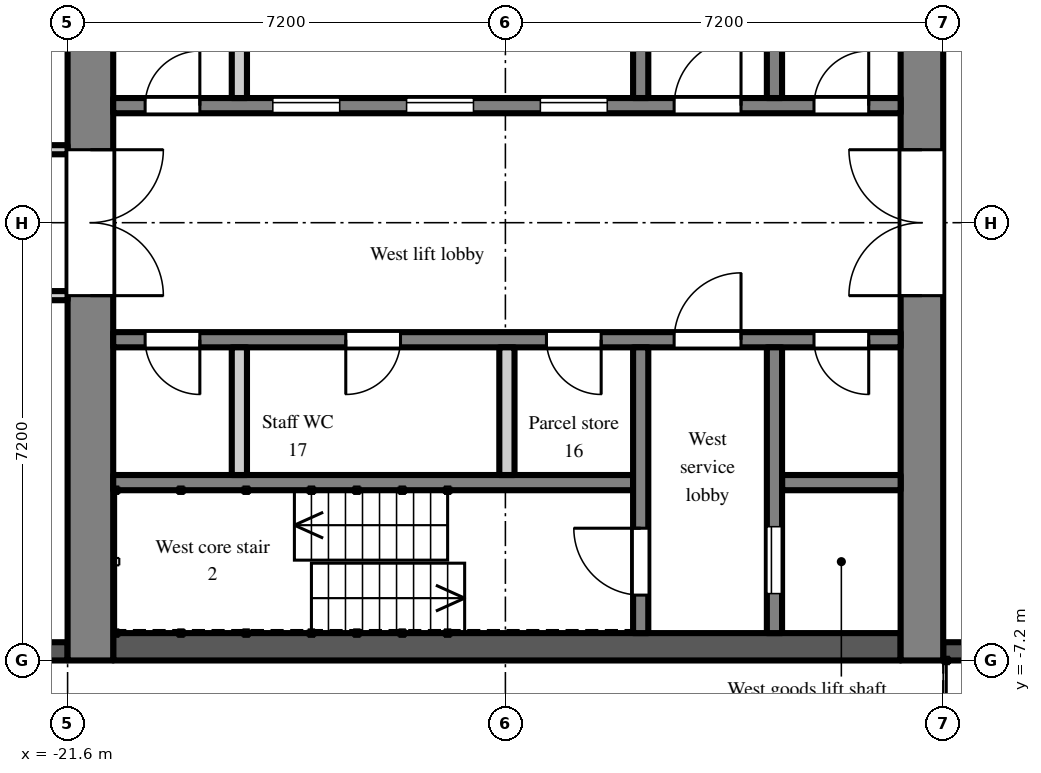
"""IFC4 building model, lengths in metres.
Left out: names, types, materials, properties, quantities, classifications, styles, units other than length and angle.
Written with IfcOpenShell. Run it as: python <this file> out.ifc"""

import sys

from ifc_helpers import new_model, si_unit, direction, frame, frame_2d, origin, place, context, subcontext, project, spatial, rectangle, extrude, element, fill, save


model = new_model("IFC4")
c1 = context("Model", 3, precision=1e-05, world=origin(), true_north=direction((0.0, 1.0)))
c2 = subcontext(c1, "Body", "Model", "MODEL_VIEW")
j1 = project(units=[si_unit("LENGTHUNIT", "METRE"), si_unit("PLANEANGLEUNIT", "RADIAN")], contexts=[c1])
p1 = place(None, origin())
s1 = spatial("IfcSite", under=j1, at=p1, CompositionType="ELEMENT")
p2 = place(p1, origin())
s2 = spatial("IfcBuilding", under=s1, at=p2, CompositionType="ELEMENT")
p3 = place(p2, frame((0.0, 0.0, 147.3)))
s3 = spatial("IfcBuildingStorey", under=s2, at=p3, CompositionType="ELEMENT", Elevation=147.3)
p4 = place(p3, frame((-24.3, -7.05, 0.0), z_axis=(0.0, 0.0, 1.0), x_axis=(1.0, 0.0, 0.0)))
e1 = element("IfcWall", 1, at=p4, inside=s3, PredefinedType="SOLIDWALL", context=c2, shape_type="SweptSolid", body=[
    extrude(rectangle(XDim=2.7, YDim=0.3, at=frame_2d((1.35, 0.0))), origin(), (0.0, 0.0, 1.0), 2.2),
])
p5 = place(p4, frame((0.75, 0.0, 0.2)))
e2 = element("IfcOpeningElement", 2, at=p5, cuts=e1, PredefinedType="OPENING", context=c2, shape_type="SweptSolid", body=[
    extrude(rectangle(XDim=1.2, YDim=1.85, at=frame_2d((0.6, 0.925))), frame((0.0, 0.16, 0.0), z_axis=(0.0, -1.0, 0.0), x_axis=(1.0, 0.0, 0.0)), (0.0, 0.0, 1.0), 0.32),
])
p6 = place(p3, frame((-7.2, -7.05, 0.0), z_axis=(0.0, 0.0, 1.0), x_axis=(1.0, 0.0, 0.0)))
e3 = element("IfcWall", 3, at=p6, inside=s3, PredefinedType="SOLIDWALL", context=c2, shape_type="SweptSolid", body=[
    extrude(rectangle(XDim=3.0, YDim=0.3, at=frame_2d((1.5, 0.0))), origin(), (0.0, 0.0, 1.0), 2.2),
])
p7 = place(p3, frame((-7.55, -7.2, 0.0), z_axis=(0.0, 0.0, 1.0), x_axis=(0.0, 1.0, 0.0)))
e4 = element("IfcWall", 4, at=p7, inside=s3, PredefinedType="SHEAR", context=c2, shape_type="SweptSolid", body=[
    extrude(rectangle(XDim=14.4, YDim=0.7, at=frame_2d((7.2, 0.0))), origin(), (0.0, 0.0, 1.0), 2.6),
])
p8 = place(p7, frame((6.0, 0.0, 0.0)))
e5 = element("IfcOpeningElement", 5, at=p8, cuts=e4, PredefinedType="OPENING", context=c2, shape_type="SweptSolid", body=[
    extrude(rectangle(XDim=2.4, YDim=2.2, at=frame_2d((1.2, 1.1))), frame((0.0, 0.36, 0.0), z_axis=(0.0, -1.0, 0.0), x_axis=(1.0, 0.0, 0.0)), (0.0, 0.0, 1.0), 0.72),
])
p9 = place(p3, frame((-21.225, -7.2, 0.0), z_axis=(0.0, 0.0, 1.0), x_axis=(0.0, 1.0, 0.0)))
e6 = element("IfcWall", 6, at=p9, inside=s3, PredefinedType="SHEAR", context=c2, shape_type="SweptSolid", body=[
    extrude(rectangle(XDim=14.4, YDim=0.75, at=frame_2d((7.2, 0.0))), origin(), (0.0, 0.0, 1.0), 2.6),
])
p10 = place(p9, frame((6.0, 0.0, 0.0)))
e7 = element("IfcOpeningElement", 7, at=p10, cuts=e6, PredefinedType="OPENING", context=c2, shape_type="SweptSolid", body=[
    extrude(rectangle(XDim=2.4, YDim=2.2, at=frame_2d((1.2, 1.1))), frame((0.0, 0.385, 0.0), z_axis=(0.0, -1.0, 0.0), x_axis=(1.0, 0.0, 0.0)), (0.0, 0.0, 1.0), 0.77),
])
p11 = place(p3, frame((-7.9, 1.925, 0.0), z_axis=(0.0, 0.0, 1.0), x_axis=(-1.0, 0.0, 0.0)))
e8 = element("IfcWall", 8, at=p11, inside=s3, PredefinedType="SHEAR", context=c2, shape_type="SweptSolid", body=[
    extrude(rectangle(XDim=12.95, YDim=0.25, at=frame_2d((6.475, 0.0))), origin(), (0.0, 0.0, 1.0), 2.6),
])
p12 = place(p11, frame((4.825, 0.0, 0.0)))
e9 = element("IfcOpeningElement", 9, at=p12, cuts=e8, PredefinedType="OPENING", context=c2, shape_type="SweptSolid", body=[
    extrude(rectangle(XDim=1.1, YDim=2.1, at=frame_2d((0.55, 1.05))), frame((0.0, 0.135, 0.0), z_axis=(0.0, -1.0, 0.0), x_axis=(1.0, 0.0, 0.0)), (0.0, 0.0, 1.0), 0.27),
])
p13 = place(p11, frame((7.025, 0.0, 0.0)))
e10 = element("IfcOpeningElement", 10, at=p13, cuts=e8, PredefinedType="OPENING", context=c2, shape_type="SweptSolid", body=[
    extrude(rectangle(XDim=1.1, YDim=2.1, at=frame_2d((0.55, 1.05))), frame((0.0, 0.135, 0.0), z_axis=(0.0, -1.0, 0.0), x_axis=(1.0, 0.0, 0.0)), (0.0, 0.0, 1.0), 0.27),
])
p14 = place(p11, frame((9.225, 0.0, 0.0)))
e11 = element("IfcOpeningElement", 11, at=p14, cuts=e8, PredefinedType="OPENING", context=c2, shape_type="SweptSolid", body=[
    extrude(rectangle(XDim=1.1, YDim=2.1, at=frame_2d((0.55, 1.05))), frame((0.0, 0.135, 0.0), z_axis=(0.0, -1.0, 0.0), x_axis=(1.0, 0.0, 0.0)), (0.0, 0.0, 1.0), 0.27),
])
p15 = place(p11, frame((0.525, 0.0, 0.0)))
e12 = element("IfcOpeningElement", 12, at=p15, cuts=e8, PredefinedType="OPENING", context=c2, shape_type="SweptSolid", body=[
    extrude(rectangle(XDim=0.9, YDim=2.1, at=frame_2d((0.45, 1.05))), frame((0.0, 0.135, 0.0), z_axis=(0.0, -1.0, 0.0), x_axis=(1.0, 0.0, 0.0)), (0.0, 0.0, 1.0), 0.27),
])
p16 = place(p11, frame((2.625, 0.0, 0.0)))
e13 = element("IfcOpeningElement", 13, at=p16, cuts=e8, PredefinedType="OPENING", context=c2, shape_type="SweptSolid", body=[
    extrude(rectangle(XDim=1.1, YDim=2.1, at=frame_2d((0.55, 1.05))), frame((0.0, 0.135, 0.0), z_axis=(0.0, -1.0, 0.0), x_axis=(1.0, 0.0, 0.0)), (0.0, 0.0, 1.0), 0.27),
])
p17 = place(p11, frame((11.525, 0.0, 0.0)))
e14 = element("IfcOpeningElement", 14, at=p17, cuts=e8, PredefinedType="OPENING", context=c2, shape_type="SweptSolid", body=[
    extrude(rectangle(XDim=0.9, YDim=2.1, at=frame_2d((0.45, 1.05))), frame((0.0, 0.135, 0.0), z_axis=(0.0, -1.0, 0.0), x_axis=(1.0, 0.0, 0.0)), (0.0, 0.0, 1.0), 0.27),
])
p18 = place(p3, frame((-9.975, 2.05, 0.0), z_axis=(0.0, 0.0, 1.0), x_axis=(0.0, 1.0, 0.0)))
e15 = element("IfcWall", 15, at=p18, inside=s3, PredefinedType="SHEAR", context=c2, shape_type="SweptSolid", body=[
    extrude(rectangle(XDim=4.7, YDim=0.25, at=frame_2d((2.35, 0.0))), origin(), (0.0, 0.0, 1.0), 2.6),
])
p19 = place(p18, frame((2.95, 0.0, 0.0)))
e16 = element("IfcOpeningElement", 16, at=p19, cuts=e15, PredefinedType="OPENING", context=c2, shape_type="SweptSolid", body=[
    extrude(rectangle(XDim=1.1, YDim=2.1, at=frame_2d((0.55, 1.05))), frame((0.0, 0.135, 0.0), z_axis=(0.0, -1.0, 0.0), x_axis=(1.0, 0.0, 0.0)), (0.0, 0.0, 1.0), 0.27),
])
p20 = place(p3, frame((-12.175, 2.05, 0.0), z_axis=(0.0, 0.0, 1.0), x_axis=(0.0, 1.0, 0.0)))
e17 = element("IfcWall", 17, at=p20, inside=s3, PredefinedType="SHEAR", context=c2, shape_type="SweptSolid", body=[
    extrude(rectangle(XDim=4.7, YDim=0.25, at=frame_2d((2.35, 0.0))), origin(), (0.0, 0.0, 1.0), 2.6),
])
p21 = place(p20, frame((2.975, 0.0, 0.0)))
e18 = element("IfcOpeningElement", 18, at=p21, cuts=e17, PredefinedType="OPENING", context=c2, shape_type="SweptSolid", body=[
    extrude(rectangle(XDim=1.1, YDim=2.1, at=frame_2d((0.55, 1.05))), frame((0.0, 0.135, 0.0), z_axis=(0.0, -1.0, 0.0), x_axis=(1.0, 0.0, 0.0)), (0.0, 0.0, 1.0), 0.27),
])
p22 = place(p3, frame((-18.775, 2.05, 0.0), z_axis=(0.0, 0.0, 1.0), x_axis=(0.0, 1.0, 0.0)))
e19 = element("IfcWall", 19, at=p22, inside=s3, PredefinedType="PARTITIONING", context=c2, shape_type="SweptSolid", body=[
    extrude(rectangle(XDim=2.1, YDim=0.25, at=frame_2d((1.05, 0.0))), origin(), (0.0, 0.0, 1.0), 2.6),
])
p23 = place(p3, frame((-7.9, -6.975, 0.0), z_axis=(0.0, 0.0, 1.0), x_axis=(-1.0, 0.0, 0.0)))
e20 = element("IfcWall", 20, at=p23, inside=s3, PredefinedType="SHEAR", context=c2, shape_type="SweptSolid", body=[
    extrude(rectangle(XDim=12.95, YDim=0.45, at=frame_2d((6.475, 0.0))), origin(), (0.0, 0.0, 1.0), 2.6),
])
p24 = place(p3, frame((-7.9, -1.925, 0.0), z_axis=(0.0, 0.0, 1.0), x_axis=(-1.0, 0.0, 0.0)))
e21 = element("IfcWall", 21, at=p24, inside=s3, PredefinedType="SHEAR", context=c2, shape_type="SweptSolid", body=[
    extrude(rectangle(XDim=12.95, YDim=0.25, at=frame_2d((6.475, 0.0))), origin(), (0.0, 0.0, 1.0), 2.6),
])
p25 = place(p24, frame((0.525, 0.0, 0.0)))
e22 = element("IfcOpeningElement", 22, at=p25, cuts=e21, PredefinedType="OPENING", context=c2, shape_type="SweptSolid", body=[
    extrude(rectangle(XDim=0.9, YDim=2.1, at=frame_2d((0.45, 1.05))), frame((0.0, 0.135, 0.0), z_axis=(0.0, -1.0, 0.0), x_axis=(1.0, 0.0, 0.0)), (0.0, 0.0, 1.0), 0.27),
])
p26 = place(p24, frame((2.625, 0.0, 0.0)))
e23 = element("IfcOpeningElement", 23, at=p26, cuts=e21, PredefinedType="OPENING", context=c2, shape_type="SweptSolid", body=[
    extrude(rectangle(XDim=1.1, YDim=2.1, at=frame_2d((0.55, 1.05))), frame((0.0, 0.135, 0.0), z_axis=(0.0, -1.0, 0.0), x_axis=(1.0, 0.0, 0.0)), (0.0, 0.0, 1.0), 0.27),
])
p27 = place(p24, frame((4.925, 0.0, 0.0)))
e24 = element("IfcOpeningElement", 24, at=p27, cuts=e21, PredefinedType="OPENING", context=c2, shape_type="SweptSolid", body=[
    extrude(rectangle(XDim=0.9, YDim=2.1, at=frame_2d((0.45, 1.05))), frame((0.0, 0.135, 0.0), z_axis=(0.0, -1.0, 0.0), x_axis=(1.0, 0.0, 0.0)), (0.0, 0.0, 1.0), 0.27),
])
p28 = place(p24, frame((8.225, 0.0, 0.0)))
e25 = element("IfcOpeningElement", 25, at=p28, cuts=e21, PredefinedType="OPENING", context=c2, shape_type="SweptSolid", body=[
    extrude(rectangle(XDim=0.9, YDim=2.1, at=frame_2d((0.45, 1.05))), frame((0.0, 0.135, 0.0), z_axis=(0.0, -1.0, 0.0), x_axis=(1.0, 0.0, 0.0)), (0.0, 0.0, 1.0), 0.27),
])
p29 = place(p24, frame((11.525, 0.0, 0.0)))
e26 = element("IfcOpeningElement", 26, at=p29, cuts=e21, PredefinedType="OPENING", context=c2, shape_type="SweptSolid", body=[
    extrude(rectangle(XDim=0.9, YDim=2.1, at=frame_2d((0.45, 1.05))), frame((0.0, 0.135, 0.0), z_axis=(0.0, -1.0, 0.0), x_axis=(1.0, 0.0, 0.0)), (0.0, 0.0, 1.0), 0.27),
])
p30 = place(p3, frame((-7.9, -4.275, 0.0), z_axis=(0.0, 0.0, 1.0), x_axis=(-1.0, 0.0, 0.0)))
e27 = element("IfcWall", 27, at=p30, inside=s3, PredefinedType="SHEAR", context=c2, shape_type="SweptSolid", body=[
    extrude(rectangle(XDim=1.95, YDim=0.25, at=frame_2d((0.975, 0.0))), origin(), (0.0, 0.0, 1.0), 2.6),
])
p31 = place(p3, frame((-12.3, -4.275, 0.0), z_axis=(0.0, 0.0, 1.0), x_axis=(-1.0, 0.0, 0.0)))
e28 = element("IfcWall", 28, at=p31, inside=s3, PredefinedType="SHEAR", context=c2, shape_type="SweptSolid", body=[
    extrude(rectangle(XDim=8.55, YDim=0.25, at=frame_2d((4.275, 0.0))), origin(), (0.0, 0.0, 1.0), 2.6),
])
p32 = place(p3, frame((-9.975, -2.05, 0.0), z_axis=(0.0, 0.0, 1.0), x_axis=(0.0, -1.0, 0.0)))
e29 = element("IfcWall", 29, at=p32, inside=s3, PredefinedType="SHEAR", context=c2, shape_type="SweptSolid", body=[
    extrude(rectangle(XDim=4.7, YDim=0.25, at=frame_2d((2.35, 0.0))), origin(), (0.0, 0.0, 1.0), 2.6),
])
p33 = place(p32, frame((2.95, 0.0, 0.0)))
e30 = element("IfcOpeningElement", 30, at=p33, cuts=e29, PredefinedType="OPENING", context=c2, shape_type="SweptSolid", body=[
    extrude(rectangle(XDim=1.1, YDim=2.1, at=frame_2d((0.55, 1.05))), frame((0.0, 0.135, 0.0), z_axis=(0.0, -1.0, 0.0), x_axis=(1.0, 0.0, 0.0)), (0.0, 0.0, 1.0), 0.27),
])
p34 = place(p3, frame((-12.175, -2.05, 0.0), z_axis=(0.0, 0.0, 1.0), x_axis=(0.0, -1.0, 0.0)))
e31 = element("IfcWall", 31, at=p34, inside=s3, PredefinedType="SHEAR", context=c2, shape_type="SweptSolid", body=[
    extrude(rectangle(XDim=4.7, YDim=0.25, at=frame_2d((2.35, 0.0))), origin(), (0.0, 0.0, 1.0), 2.6),
])
p35 = place(p34, frame((2.975, 0.0, 0.0)))
e32 = element("IfcOpeningElement", 32, at=p35, cuts=e31, PredefinedType="OPENING", context=c2, shape_type="SweptSolid", body=[
    extrude(rectangle(XDim=1.1, YDim=2.1, at=frame_2d((0.55, 1.05))), frame((0.0, 0.135, 0.0), z_axis=(0.0, -1.0, 0.0), x_axis=(1.0, 0.0, 0.0)), (0.0, 0.0, 1.0), 0.27),
])
for number, where, z_axis, x_axis in (
    (33, (-14.375, -2.05, 0.0), (0.0, 0.0, 1.0), (0.0, -1.0, 0.0)),
    (34, (-18.775, -2.05, 0.0), (0.0, 0.0, 1.0), (0.0, -1.0, 0.0)),
):
    element("IfcWall", number, at=place(p3, frame(where, z_axis=z_axis, x_axis=x_axis)), inside=s3, PredefinedType="PARTITIONING", context=c2, shape_type="SweptSolid", body=[
        extrude(rectangle(XDim=2.1, YDim=0.25, at=frame_2d((1.05, 0.0))), origin(), (0.0, 0.0, 1.0), 2.6),
    ])
p36 = place(p3, frame((-36.5, -1.2, 0.0), z_axis=(0.0, 0.0, 1.0), x_axis=(1.0, 0.0, 0.0)))
e35 = element("IfcWall", 35, at=p36, inside=s3, PredefinedType="PARTITIONING", context=c2, shape_type="SweptSolid", body=[
    extrude(rectangle(XDim=14.9, YDim=0.15, at=frame_2d((7.45, 0.0))), origin(), (0.0, 0.0, 1.0), 2.6),
])
p37 = place(p36, frame((7.9, 0.0, 0.0)))
e36 = element("IfcOpeningElement", 36, at=p37, cuts=e35, PredefinedType="OPENING", context=c2, shape_type="SweptSolid", body=[
    extrude(rectangle(XDim=1.0, YDim=2.1, at=frame_2d((0.5, 1.05))), frame((0.0, 0.085, 0.0), z_axis=(0.0, -1.0, 0.0), x_axis=(1.0, 0.0, 0.0)), (0.0, 0.0, 1.0), 0.17),
])
p38 = place(p36, frame((6.35, 0.0, 0.0)))
e37 = element("IfcOpeningElement", 37, at=p38, cuts=e35, PredefinedType="OPENING", context=c2, shape_type="SweptSolid", body=[
    extrude(rectangle(XDim=0.9, YDim=2.1, at=frame_2d((0.45, 1.05))), frame((0.0, 0.085, 0.0), z_axis=(0.0, -1.0, 0.0), x_axis=(1.0, 0.0, 0.0)), (0.0, 0.0, 1.0), 0.17),
])
p39 = place(p36, frame((4.55, 0.0, 0.0)))
e38 = element("IfcOpeningElement", 38, at=p39, cuts=e35, PredefinedType="OPENING", context=c2, shape_type="SweptSolid", body=[
    extrude(rectangle(XDim=0.9, YDim=2.1, at=frame_2d((0.45, 1.05))), frame((0.0, 0.085, 0.0), z_axis=(0.0, -1.0, 0.0), x_axis=(1.0, 0.0, 0.0)), (0.0, 0.0, 1.0), 0.17),
])
p40 = place(p36, frame((1.15, 0.0, 0.0)))
e39 = element("IfcOpeningElement", 39, at=p40, cuts=e35, PredefinedType="OPENING", context=c2, shape_type="SweptSolid", body=[
    extrude(rectangle(XDim=1.8, YDim=2.1, at=frame_2d((0.9, 1.05))), frame((0.0, 0.085, 0.0), z_axis=(0.0, -1.0, 0.0), x_axis=(1.0, 0.0, 0.0)), (0.0, 0.0, 1.0), 0.17),
])
p41 = place(p3, frame((-36.5, 1.2, 0.0), z_axis=(0.0, 0.0, 1.0), x_axis=(1.0, 0.0, 0.0)))
e40 = element("IfcWall", 40, at=p41, inside=s3, PredefinedType="PARTITIONING", context=c2, shape_type="SweptSolid", body=[
    extrude(rectangle(XDim=14.9, YDim=0.15, at=frame_2d((7.45, 0.0))), origin(), (0.0, 0.0, 1.0), 2.6),
])
p42 = place(p41, frame((13.55, 0.0, 0.0)))
e41 = element("IfcOpeningElement", 41, at=p42, cuts=e40, PredefinedType="OPENING", context=c2, shape_type="SweptSolid", body=[
    extrude(rectangle(XDim=0.9, YDim=2.1, at=frame_2d((0.45, 1.05))), frame((0.0, 0.085, 0.0), z_axis=(0.0, -1.0, 0.0), x_axis=(1.0, 0.0, 0.0)), (0.0, 0.0, 1.0), 0.17),
])
p43 = place(p41, frame((11.75, 0.0, 0.0)))
e42 = element("IfcOpeningElement", 42, at=p43, cuts=e40, PredefinedType="OPENING", context=c2, shape_type="SweptSolid", body=[
    extrude(rectangle(XDim=0.9, YDim=2.1, at=frame_2d((0.45, 1.05))), frame((0.0, 0.085, 0.0), z_axis=(0.0, -1.0, 0.0), x_axis=(1.0, 0.0, 0.0)), (0.0, 0.0, 1.0), 0.17),
])
p44 = place(p41, frame((8.3, 0.0, 0.0)))
e43 = element("IfcOpeningElement", 43, at=p44, cuts=e40, PredefinedType="OPENING", context=c2, shape_type="SweptSolid", body=[
    extrude(rectangle(XDim=1.0, YDim=2.1, at=frame_2d((0.5, 1.05))), frame((0.0, 0.085, 0.0), z_axis=(0.0, -1.0, 0.0), x_axis=(1.0, 0.0, 0.0)), (0.0, 0.0, 1.0), 0.17),
])
p45 = place(p41, frame((6.35, 0.0, 0.0)))
e44 = element("IfcOpeningElement", 44, at=p45, cuts=e40, PredefinedType="OPENING", context=c2, shape_type="SweptSolid", body=[
    extrude(rectangle(XDim=0.9, YDim=2.1, at=frame_2d((0.45, 1.05))), frame((0.0, 0.085, 0.0), z_axis=(0.0, -1.0, 0.0), x_axis=(1.0, 0.0, 0.0)), (0.0, 0.0, 1.0), 0.17),
])
p46 = place(p41, frame((4.55, 0.0, 0.0)))
e45 = element("IfcOpeningElement", 45, at=p46, cuts=e40, PredefinedType="OPENING", context=c2, shape_type="SweptSolid", body=[
    extrude(rectangle(XDim=0.9, YDim=2.1, at=frame_2d((0.45, 1.05))), frame((0.0, 0.085, 0.0), z_axis=(0.0, -1.0, 0.0), x_axis=(1.0, 0.0, 0.0)), (0.0, 0.0, 1.0), 0.17),
])
p47 = place(p41, frame((1.15, 0.0, 0.0)))
e46 = element("IfcOpeningElement", 46, at=p47, cuts=e40, PredefinedType="OPENING", context=c2, shape_type="SweptSolid", body=[
    extrude(rectangle(XDim=1.8, YDim=2.1, at=frame_2d((0.9, 1.05))), frame((0.0, 0.085, 0.0), z_axis=(0.0, -1.0, 0.0), x_axis=(1.0, 0.0, 0.0)), (0.0, 0.0, 1.0), 0.17),
])
p48 = place(p12, origin())
e47 = element("IfcDoor", 47, at=p48, inside=s3, OperationType="SLIDING_TO_LEFT", PredefinedType="DOOR", context=c2, shape_type="SweptSolid", body=[
    extrude(rectangle(XDim=1.1, YDim=2.1, at=frame_2d((0.55, 1.05))), frame((0.0, 0.025, 0.0), z_axis=(0.0, -1.0, 0.0), x_axis=(1.0, 0.0, 0.0)), (0.0, 0.0, 1.0), 0.05),
])
fill(e9, e47)
p49 = place(p13, origin())
e48 = element("IfcDoor", 48, at=p49, inside=s3, OperationType="SLIDING_TO_LEFT", PredefinedType="DOOR", context=c2, shape_type="SweptSolid", body=[
    extrude(rectangle(XDim=1.1, YDim=2.1, at=frame_2d((0.55, 1.05))), frame((0.0, 0.025, 0.0), z_axis=(0.0, -1.0, 0.0), x_axis=(1.0, 0.0, 0.0)), (0.0, 0.0, 1.0), 0.05),
])
fill(e10, e48)
p50 = place(p14, origin())
e49 = element("IfcDoor", 49, at=p50, inside=s3, OperationType="SLIDING_TO_LEFT", PredefinedType="DOOR", context=c2, shape_type="SweptSolid", body=[
    extrude(rectangle(XDim=1.1, YDim=2.1, at=frame_2d((0.55, 1.05))), frame((0.0, 0.025, 0.0), z_axis=(0.0, -1.0, 0.0), x_axis=(1.0, 0.0, 0.0)), (0.0, 0.0, 1.0), 0.05),
])
fill(e11, e49)
p51 = place(p33, origin())
e50 = element("IfcDoor", 50, at=p51, inside=s3, OperationType="SLIDING_TO_LEFT", PredefinedType="DOOR", context=c2, shape_type="SweptSolid", body=[
    extrude(rectangle(XDim=1.1, YDim=2.1, at=frame_2d((0.55, 1.05))), frame((0.0, 0.025, 0.0), z_axis=(0.0, -1.0, 0.0), x_axis=(1.0, 0.0, 0.0)), (0.0, 0.0, 1.0), 0.05),
])
fill(e30, e50)
p52 = place(p35, frame((1.1, 0.0, 0.0), z_axis=(0.0, 0.0, 1.0), x_axis=(-1.0, 0.0, 0.0)))
e51 = element("IfcDoor", 51, at=p52, inside=s3, OperationType="SINGLE_SWING_RIGHT", PredefinedType="DOOR", context=c2, shape_type="SweptSolid", body=[
    extrude(rectangle(XDim=1.1, YDim=2.1, at=frame_2d((0.55, 1.05))), frame((0.0, 0.025, 0.0), z_axis=(0.0, -1.0, 0.0), x_axis=(1.0, 0.0, 0.0)), (0.0, 0.0, 1.0), 0.05),
])
fill(e32, e51)
p53 = place(p15, frame((0.9, 0.0, 0.0), z_axis=(0.0, 0.0, 1.0), x_axis=(-1.0, 0.0, 0.0)))
e52 = element("IfcDoor", 52, at=p53, inside=s3, OperationType="SINGLE_SWING_RIGHT", PredefinedType="DOOR", context=c2, shape_type="SweptSolid", body=[
    extrude(rectangle(XDim=0.9, YDim=2.1, at=frame_2d((0.45, 1.05))), frame((0.0, 0.025, 0.0), z_axis=(0.0, -1.0, 0.0), x_axis=(1.0, 0.0, 0.0)), (0.0, 0.0, 1.0), 0.05),
])
fill(e12, e52)
p54 = place(p25, origin())
e53 = element("IfcDoor", 53, at=p54, inside=s3, OperationType="SINGLE_SWING_LEFT", PredefinedType="DOOR", context=c2, shape_type="SweptSolid", body=[
    extrude(rectangle(XDim=0.9, YDim=2.1, at=frame_2d((0.45, 1.05))), frame((0.0, 0.025, 0.0), z_axis=(0.0, -1.0, 0.0), x_axis=(1.0, 0.0, 0.0)), (0.0, 0.0, 1.0), 0.05),
])
fill(e22, e53)
p55 = place(p16, frame((1.1, 0.0, 0.0), z_axis=(0.0, 0.0, 1.0), x_axis=(-1.0, 0.0, 0.0)))
e54 = element("IfcDoor", 54, at=p55, inside=s3, OperationType="SINGLE_SWING_RIGHT", PredefinedType="DOOR", context=c2, shape_type="SweptSolid", body=[
    extrude(rectangle(XDim=1.1, YDim=2.1, at=frame_2d((0.55, 1.05))), frame((0.0, 0.025, 0.0), z_axis=(0.0, -1.0, 0.0), x_axis=(1.0, 0.0, 0.0)), (0.0, 0.0, 1.0), 0.05),
])
fill(e13, e54)
p56 = place(p26, frame((1.1, 0.0, 0.0), z_axis=(0.0, 0.0, 1.0), x_axis=(-1.0, 0.0, 0.0)))
e55 = element("IfcDoor", 55, at=p56, inside=s3, OperationType="SINGLE_SWING_RIGHT", PredefinedType="DOOR", context=c2, shape_type="SweptSolid", body=[
    extrude(rectangle(XDim=1.1, YDim=2.1, at=frame_2d((0.55, 1.05))), frame((0.0, 0.025, 0.0), z_axis=(0.0, -1.0, 0.0), x_axis=(1.0, 0.0, 0.0)), (0.0, 0.0, 1.0), 0.05),
])
fill(e23, e55)
p57 = place(p8, origin())
e56 = element("IfcDoor", 56, at=p57, inside=s3, OperationType="DOUBLE_DOOR_DOUBLE_SWING", PredefinedType="DOOR", context=c2, shape_type="SweptSolid", body=[
    extrude(rectangle(XDim=2.4, YDim=2.2, at=frame_2d((1.2, 1.1))), frame((0.0, 0.025, 0.0), z_axis=(0.0, -1.0, 0.0), x_axis=(1.0, 0.0, 0.0)), (0.0, 0.0, 1.0), 0.05),
])
fill(e5, e56)
p58 = place(p10, frame((2.4, 0.0, 0.0), z_axis=(0.0, 0.0, 1.0), x_axis=(-1.0, 0.0, 0.0)))
e57 = element("IfcDoor", 57, at=p58, inside=s3, OperationType="DOUBLE_DOOR_DOUBLE_SWING", PredefinedType="DOOR", context=c2, shape_type="SweptSolid", body=[
    extrude(rectangle(XDim=2.4, YDim=2.2, at=frame_2d((1.2, 1.1))), frame((0.0, 0.025, 0.0), z_axis=(0.0, -1.0, 0.0), x_axis=(1.0, 0.0, 0.0)), (0.0, 0.0, 1.0), 0.05),
])
fill(e7, e57)
p59 = place(p17, frame((0.9, 0.0, 0.0), z_axis=(0.0, 0.0, 1.0), x_axis=(-1.0, 0.0, 0.0)))
e58 = element("IfcDoor", 58, at=p59, inside=s3, OperationType="SINGLE_SWING_RIGHT", PredefinedType="DOOR", context=c2, shape_type="SweptSolid", body=[
    extrude(rectangle(XDim=0.9, YDim=2.1, at=frame_2d((0.45, 1.05))), frame((0.0, 0.025, 0.0), z_axis=(0.0, -1.0, 0.0), x_axis=(1.0, 0.0, 0.0)), (0.0, 0.0, 1.0), 0.05),
])
fill(e14, e58)
p60 = place(p27, origin())
e59 = element("IfcDoor", 59, at=p60, inside=s3, OperationType="SINGLE_SWING_LEFT", PredefinedType="DOOR", context=c2, shape_type="SweptSolid", body=[
    extrude(rectangle(XDim=0.9, YDim=2.1, at=frame_2d((0.45, 1.05))), frame((0.0, 0.025, 0.0), z_axis=(0.0, -1.0, 0.0), x_axis=(1.0, 0.0, 0.0)), (0.0, 0.0, 1.0), 0.05),
])
fill(e24, e59)
p61 = place(p28, origin())
e60 = element("IfcDoor", 60, at=p61, inside=s3, OperationType="SINGLE_SWING_RIGHT", PredefinedType="DOOR", context=c2, shape_type="SweptSolid", body=[
    extrude(rectangle(XDim=0.9, YDim=2.1, at=frame_2d((0.45, 1.05))), frame((0.0, 0.025, 0.0), z_axis=(0.0, -1.0, 0.0), x_axis=(1.0, 0.0, 0.0)), (0.0, 0.0, 1.0), 0.05),
])
fill(e25, e60)
p62 = place(p29, origin())
e61 = element("IfcDoor", 61, at=p62, inside=s3, OperationType="SINGLE_SWING_LEFT", PredefinedType="DOOR", context=c2, shape_type="SweptSolid", body=[
    extrude(rectangle(XDim=0.9, YDim=2.1, at=frame_2d((0.45, 1.05))), frame((0.0, 0.025, 0.0), z_axis=(0.0, -1.0, 0.0), x_axis=(1.0, 0.0, 0.0)), (0.0, 0.0, 1.0), 0.05),
])
fill(e26, e61)
save(model, sys.argv[1])
